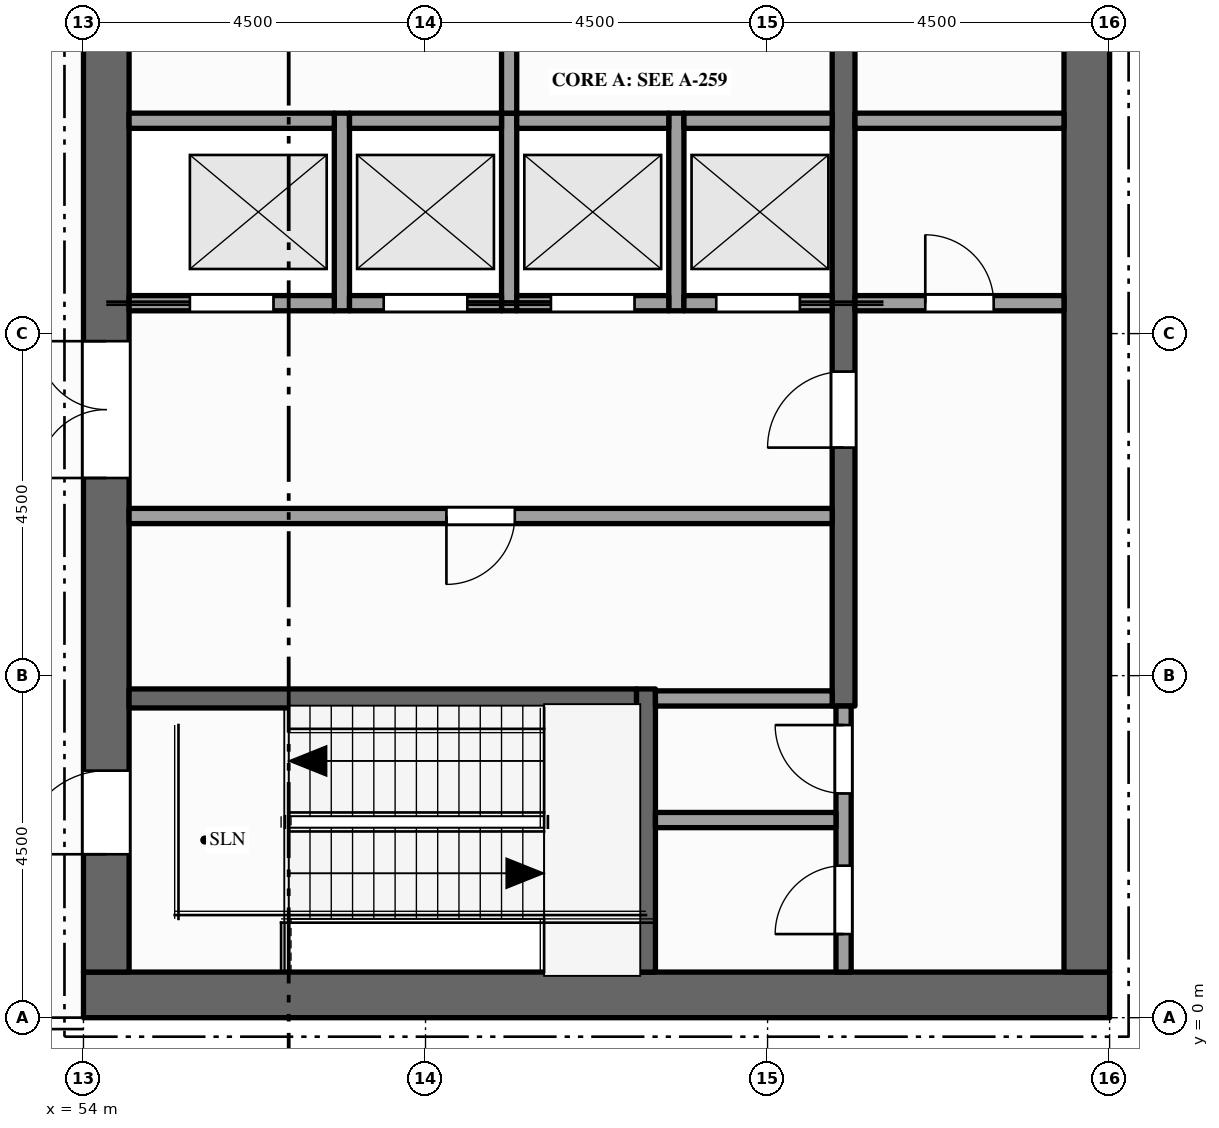
"""IFC4 building model, lengths in metres.
Left out: names, types, materials, properties, quantities, classifications, styles, units other than length and angle.
Written with IfcOpenShell. Run it as: python <this file> out.ifc"""

import sys

from ifc_helpers import new_model, si_unit, direction, frame, frame_2d, origin, place, context, subcontext, project, spatial, rectangle, extrude, element, fill, save


model = new_model("IFC4")
c1 = context("Model", 3, precision=1e-05, world=origin(), true_north=direction((0.0, 1.0)))
c2 = subcontext(c1, "Body", "Model", "MODEL_VIEW")
j1 = project(units=[si_unit("LENGTHUNIT", "METRE"), si_unit("PLANEANGLEUNIT", "RADIAN")], contexts=[c1])
p1 = place(None, origin())
s1 = spatial("IfcSite", under=j1, at=p1, CompositionType="ELEMENT")
p2 = place(p1, origin())
s2 = spatial("IfcBuilding", under=s1, at=p2, CompositionType="ELEMENT")
p3 = place(p2, frame((0.0, 0.0, 327.5)))
s3 = spatial("IfcBuildingStorey", under=s2, at=p3, CompositionType="ELEMENT", Elevation=327.5)
p4 = place(p3, frame((67.5, 0.3, -0.15), z_axis=(0.0, 0.0, 1.0), x_axis=(-1.0, 0.0, 0.0)))
e1 = element("IfcWall", 1, at=p4, inside=s3, PredefinedType="SHEAR", context=c2, shape_type="SweptSolid", body=[
    extrude(rectangle(XDim=13.5, YDim=0.6, at=frame_2d((6.75, 0.0))), origin(), (0.0, 0.0, 1.0), 4.5),
])
p5 = place(p3, frame((54.3, 0.6, -0.15), z_axis=(0.0, 0.0, 1.0), x_axis=(0.0, 1.0, 0.0)))
e2 = element("IfcWall", 2, at=p5, inside=s3, PredefinedType="SHEAR", context=c2, shape_type="SweptSolid", body=[
    extrude(rectangle(XDim=21.3, YDim=0.6, at=frame_2d((10.65, 0.0))), origin(), (0.0, 0.0, 1.0), 4.5),
])
p6 = place(p5, frame((6.5, 0.0, 0.15)))
e3 = element("IfcOpeningElement", 3, at=p6, cuts=e2, PredefinedType="OPENING", context=c2, shape_type="SweptSolid", body=[
    extrude(rectangle(XDim=1.8, YDim=2.1, at=frame_2d((0.9, 1.05))), frame((0.0, 0.31, 0.0), z_axis=(0.0, -1.0, 0.0), x_axis=(1.0, 0.0, 0.0)), (0.0, 0.0, 1.0), 0.62),
])
p7 = place(p5, frame((12.55, 0.0, 0.15)))
e4 = element("IfcOpeningElement", 4, at=p7, cuts=e2, PredefinedType="OPENING", context=c2, shape_type="SweptSolid", body=[
    extrude(rectangle(XDim=1.1, YDim=2.1, at=frame_2d((0.55, 1.05))), frame((0.0, 0.31, 0.0), z_axis=(0.0, -1.0, 0.0), x_axis=(1.0, 0.0, 0.0)), (0.0, 0.0, 1.0), 0.62),
])
p8 = place(p5, frame((1.55, 0.0, 0.15)))
e5 = element("IfcOpeningElement", 5, at=p8, cuts=e2, PredefinedType="OPENING", context=c2, shape_type="SweptSolid", body=[
    extrude(rectangle(XDim=1.1, YDim=2.1, at=frame_2d((0.55, 1.05))), frame((0.0, 0.31, 0.0), z_axis=(0.0, -1.0, 0.0), x_axis=(1.0, 0.0, 0.0)), (0.0, 0.0, 1.0), 0.62),
])
p9 = place(p5, frame((18.75, 0.0, 0.15)))
e6 = element("IfcOpeningElement", 6, at=p9, cuts=e2, PredefinedType="OPENING", context=c2, shape_type="SweptSolid", body=[
    extrude(rectangle(XDim=1.1, YDim=2.1, at=frame_2d((0.55, 1.05))), frame((0.0, 0.31, 0.0), z_axis=(0.0, -1.0, 0.0), x_axis=(1.0, 0.0, 0.0)), (0.0, 0.0, 1.0), 0.62),
])
p10 = place(p3, frame((67.2, 0.6, -0.15), z_axis=(0.0, 0.0, 1.0), x_axis=(0.0, 1.0, 0.0)))
e7 = element("IfcWall", 7, at=p10, inside=s3, PredefinedType="SHEAR", context=c2, shape_type="SweptSolid", body=[
    extrude(rectangle(XDim=21.3, YDim=0.6, at=frame_2d((10.65, 0.0))), origin(), (0.0, 0.0, 1.0), 4.5),
])
for number, where, z_axis, x_axis in (
    (8, (57.4, 9.3, 0.0), (0.0, 0.0, 1.0), (0.0, 1.0, 0.0)),
    (9, (59.6, 9.3, 0.0), (0.0, 0.0, 1.0), (0.0, 1.0, 0.0)),
):
    element("IfcWall", number, at=place(p3, frame(where, z_axis=z_axis, x_axis=x_axis)), inside=s3, PredefinedType="SOLIDWALL", context=c2, shape_type="SweptSolid", body=[
        extrude(rectangle(XDim=2.6, YDim=0.2, at=frame_2d((1.3, 0.0))), origin(), (0.0, 0.0, 1.0), 4.35),
    ])
p11 = place(p3, frame((59.6, 11.9, 0.0), z_axis=(0.0, 0.0, 1.0), x_axis=(0.0, 1.0, 0.0)))
e10 = element("IfcWall", 10, at=p11, inside=s3, PredefinedType="PARTITIONING", context=c2, shape_type="SweptSolid", body=[
    extrude(rectangle(XDim=3.6, YDim=0.2, at=frame_2d((1.8, 0.0))), origin(), (0.0, 0.0, 1.0), 4.35),
])
p12 = place(p11, frame((1.3, 0.0, 0.0)))
e11 = element("IfcOpeningElement", 11, at=p12, cuts=e10, PredefinedType="OPENING", context=c2, shape_type="SweptSolid", body=[
    extrude(rectangle(XDim=1.0, YDim=2.1, at=frame_2d((0.5, 1.05))), frame((0.0, 0.11, 0.0), z_axis=(0.0, -1.0, 0.0), x_axis=(1.0, 0.0, 0.0)), (0.0, 0.0, 1.0), 0.22),
])
p13 = place(p3, frame((61.4, 0.6, 0.0), z_axis=(0.0, 0.0, 1.0), x_axis=(0.0, 1.0, 0.0)))
e12 = element("IfcWall", 12, at=p13, inside=s3, PredefinedType="SHEAR", context=c2, shape_type="SweptSolid", body=[
    extrude(rectangle(XDim=3.725, YDim=0.25, at=frame_2d((1.862, 0.0))), origin(), (0.0, 0.0, 1.0), 4.35),
])
p14 = place(p3, frame((61.8, 9.3, 0.0), z_axis=(0.0, 0.0, 1.0), x_axis=(0.0, 1.0, 0.0)))
e13 = element("IfcWall", 13, at=p14, inside=s3, PredefinedType="SOLIDWALL", context=c2, shape_type="SweptSolid", body=[
    extrude(rectangle(XDim=2.6, YDim=0.2, at=frame_2d((1.3, 0.0))), origin(), (0.0, 0.0, 1.0), 4.35),
])
p15 = place(p3, frame((64.0, 0.6, 0.0), z_axis=(0.0, 0.0, 1.0), x_axis=(0.0, 1.0, 0.0)))
e14 = element("IfcWall", 14, at=p15, inside=s3, PredefinedType="PARTITIONING", context=c2, shape_type="SweptSolid", body=[
    extrude(rectangle(XDim=3.5, YDim=0.2, at=frame_2d((1.75, 0.0))), origin(), (0.0, 0.0, 1.0), 4.35),
])
p16 = place(p15, frame((0.5, 0.0, 0.0)))
e15 = element("IfcOpeningElement", 15, at=p16, cuts=e14, PredefinedType="OPENING", context=c2, shape_type="SweptSolid", body=[
    extrude(rectangle(XDim=0.9, YDim=2.1, at=frame_2d((0.45, 1.05))), frame((0.0, 0.11, 0.0), z_axis=(0.0, -1.0, 0.0), x_axis=(1.0, 0.0, 0.0)), (0.0, 0.0, 1.0), 0.22),
])
p17 = place(p15, frame((2.35, 0.0, 0.0)))
e16 = element("IfcOpeningElement", 16, at=p17, cuts=e14, PredefinedType="OPENING", context=c2, shape_type="SweptSolid", body=[
    extrude(rectangle(XDim=0.9, YDim=2.1, at=frame_2d((0.45, 1.05))), frame((0.0, 0.11, 0.0), z_axis=(0.0, -1.0, 0.0), x_axis=(1.0, 0.0, 0.0)), (0.0, 0.0, 1.0), 0.22),
])
p18 = place(p3, frame((64.0, 4.1, 0.0), z_axis=(0.0, 0.0, 1.0), x_axis=(0.0, 1.0, 0.0)))
e17 = element("IfcWall", 17, at=p18, inside=s3, PredefinedType="SHEAR", context=c2, shape_type="SweptSolid", body=[
    extrude(rectangle(XDim=14.5, YDim=0.3, at=frame_2d((7.25, 0.0))), origin(), (0.0, 0.0, 1.0), 4.35),
])
p19 = place(p18, frame((3.4, 0.0, 0.0)))
e18 = element("IfcOpeningElement", 18, at=p19, cuts=e17, PredefinedType="OPENING", context=c2, shape_type="SweptSolid", body=[
    extrude(rectangle(XDim=1.0, YDim=2.1, at=frame_2d((0.5, 1.05))), frame((0.0, 0.16, 0.0), z_axis=(0.0, -1.0, 0.0), x_axis=(1.0, 0.0, 0.0)), (0.0, 0.0, 1.0), 0.32),
])
p20 = place(p18, frame((9.1, 0.0, 0.0)))
e19 = element("IfcOpeningElement", 19, at=p20, cuts=e17, PredefinedType="OPENING", context=c2, shape_type="SweptSolid", body=[
    extrude(rectangle(XDim=1.0, YDim=2.1, at=frame_2d((0.5, 1.05))), frame((0.0, 0.16, 0.0), z_axis=(0.0, -1.0, 0.0), x_axis=(1.0, 0.0, 0.0)), (0.0, 0.0, 1.0), 0.32),
])
p21 = place(p3, frame((61.525, 2.6, 0.0), z_axis=(0.0, 0.0, 1.0), x_axis=(1.0, 0.0, 0.0)))
e20 = element("IfcWall", 20, at=p21, inside=s3, PredefinedType="PARTITIONING", context=c2, shape_type="SweptSolid", body=[
    extrude(rectangle(XDim=2.375, YDim=0.2, at=frame_2d((1.188, 0.0))), origin(), (0.0, 0.0, 1.0), 4.35),
])
p22 = place(p3, frame((54.6, 4.2, 0.0), z_axis=(0.0, 0.0, 1.0), x_axis=(1.0, 0.0, 0.0)))
e21 = element("IfcWall", 21, at=p22, inside=s3, PredefinedType="SHEAR", context=c2, shape_type="SweptSolid", body=[
    extrude(rectangle(XDim=6.675, YDim=0.25, at=frame_2d((3.337, 0.0))), origin(), (0.0, 0.0, 1.0), 4.35),
])
p23 = place(p3, frame((61.525, 4.2, 0.0), z_axis=(0.0, 0.0, 1.0), x_axis=(1.0, 0.0, 0.0)))
e22 = element("IfcWall", 22, at=p23, inside=s3, PredefinedType="PARTITIONING", context=c2, shape_type="SweptSolid", body=[
    extrude(rectangle(XDim=2.325, YDim=0.2, at=frame_2d((1.163, 0.0))), origin(), (0.0, 0.0, 1.0), 4.35),
])
p24 = place(p3, frame((54.6, 6.6, 0.0), z_axis=(0.0, 0.0, 1.0), x_axis=(1.0, 0.0, 0.0)))
e23 = element("IfcWall", 23, at=p24, inside=s3, PredefinedType="PARTITIONING", context=c2, shape_type="SweptSolid", body=[
    extrude(rectangle(XDim=9.25, YDim=0.2, at=frame_2d((4.625, 0.0))), origin(), (0.0, 0.0, 1.0), 4.35),
])
p25 = place(p24, frame((4.175, 0.0, 0.0)))
e24 = element("IfcOpeningElement", 24, at=p25, cuts=e23, PredefinedType="OPENING", context=c2, shape_type="SweptSolid", body=[
    extrude(rectangle(XDim=0.9, YDim=2.1, at=frame_2d((0.45, 1.05))), frame((0.0, 0.11, 0.0), z_axis=(0.0, -1.0, 0.0), x_axis=(1.0, 0.0, 0.0)), (0.0, 0.0, 1.0), 0.22),
])
p26 = place(p3, frame((54.6, 9.4, 0.0), z_axis=(0.0, 0.0, 1.0), x_axis=(1.0, 0.0, 0.0)))
e25 = element("IfcWall", 25, at=p26, inside=s3, PredefinedType="SOLIDWALL", context=c2, shape_type="SweptSolid", body=[
    extrude(rectangle(XDim=2.7, YDim=0.2, at=frame_2d((1.35, 0.0))), origin(), (0.0, 0.0, 1.0), 4.35),
])
p27 = place(p26, frame((0.8, 0.0, 0.012)))
e26 = element("IfcOpeningElement", 26, at=p27, cuts=e25, PredefinedType="OPENING", context=c2, shape_type="SweptSolid", body=[
    extrude(rectangle(XDim=1.1, YDim=2.1, at=frame_2d((0.55, 1.05))), frame((0.0, 0.11, 0.0), z_axis=(0.0, -1.0, 0.0), x_axis=(1.0, 0.0, 0.0)), (0.0, 0.0, 1.0), 0.22),
])
p28 = place(p3, frame((57.5, 9.4, 0.0), z_axis=(0.0, 0.0, 1.0), x_axis=(1.0, 0.0, 0.0)))
e27 = element("IfcWall", 27, at=p28, inside=s3, PredefinedType="SOLIDWALL", context=c2, shape_type="SweptSolid", body=[
    extrude(rectangle(XDim=2.0, YDim=0.2, at=frame_2d((1.0, 0.0))), origin(), (0.0, 0.0, 1.0), 4.35),
])
p29 = place(p28, frame((0.45, 0.0, 0.012)))
e28 = element("IfcOpeningElement", 28, at=p29, cuts=e27, PredefinedType="OPENING", context=c2, shape_type="SweptSolid", body=[
    extrude(rectangle(XDim=1.1, YDim=2.1, at=frame_2d((0.55, 1.05))), frame((0.0, 0.11, 0.0), z_axis=(0.0, -1.0, 0.0), x_axis=(1.0, 0.0, 0.0)), (0.0, 0.0, 1.0), 0.22),
])
p30 = place(p3, frame((59.7, 9.4, 0.0), z_axis=(0.0, 0.0, 1.0), x_axis=(1.0, 0.0, 0.0)))
e29 = element("IfcWall", 29, at=p30, inside=s3, PredefinedType="SOLIDWALL", context=c2, shape_type="SweptSolid", body=[
    extrude(rectangle(XDim=2.0, YDim=0.2, at=frame_2d((1.0, 0.0))), origin(), (0.0, 0.0, 1.0), 4.35),
])
p31 = place(p30, frame((0.45, 0.0, 0.012)))
e30 = element("IfcOpeningElement", 30, at=p31, cuts=e29, PredefinedType="OPENING", context=c2, shape_type="SweptSolid", body=[
    extrude(rectangle(XDim=1.1, YDim=2.1, at=frame_2d((0.55, 1.05))), frame((0.0, 0.11, 0.0), z_axis=(0.0, -1.0, 0.0), x_axis=(1.0, 0.0, 0.0)), (0.0, 0.0, 1.0), 0.22),
])
p32 = place(p3, frame((61.9, 9.4, 0.0), z_axis=(0.0, 0.0, 1.0), x_axis=(1.0, 0.0, 0.0)))
e31 = element("IfcWall", 31, at=p32, inside=s3, PredefinedType="SOLIDWALL", context=c2, shape_type="SweptSolid", body=[
    extrude(rectangle(XDim=1.95, YDim=0.2, at=frame_2d((0.975, 0.0))), origin(), (0.0, 0.0, 1.0), 4.35),
])
p33 = place(p32, frame((0.425, 0.0, 0.012)))
e32 = element("IfcOpeningElement", 32, at=p33, cuts=e31, PredefinedType="OPENING", context=c2, shape_type="SweptSolid", body=[
    extrude(rectangle(XDim=1.1, YDim=2.1, at=frame_2d((0.55, 1.05))), frame((0.0, 0.11, 0.0), z_axis=(0.0, -1.0, 0.0), x_axis=(1.0, 0.0, 0.0)), (0.0, 0.0, 1.0), 0.22),
])
p34 = place(p3, frame((64.15, 9.4, 0.0), z_axis=(0.0, 0.0, 1.0), x_axis=(1.0, 0.0, 0.0)))
e33 = element("IfcWall", 33, at=p34, inside=s3, PredefinedType="PARTITIONING", context=c2, shape_type="SweptSolid", body=[
    extrude(rectangle(XDim=2.75, YDim=0.2, at=frame_2d((1.375, 0.0))), origin(), (0.0, 0.0, 1.0), 4.35),
])
p35 = place(p34, frame((0.925, 0.0, 0.0)))
e34 = element("IfcOpeningElement", 34, at=p35, cuts=e33, PredefinedType="OPENING", context=c2, shape_type="SweptSolid", body=[
    extrude(rectangle(XDim=0.9, YDim=2.1, at=frame_2d((0.45, 1.05))), frame((0.0, 0.11, 0.0), z_axis=(0.0, -1.0, 0.0), x_axis=(1.0, 0.0, 0.0)), (0.0, 0.0, 1.0), 0.22),
])
p36 = place(p3, frame((54.6, 11.8, 0.0), z_axis=(0.0, 0.0, 1.0), x_axis=(1.0, 0.0, 0.0)))
e35 = element("IfcWall", 35, at=p36, inside=s3, PredefinedType="SOLIDWALL", context=c2, shape_type="SweptSolid", body=[
    extrude(rectangle(XDim=2.7, YDim=0.2, at=frame_2d((1.35, 0.0))), origin(), (0.0, 0.0, 1.0), 4.35),
])
for number, where, z_axis, x_axis in (
    (36, (57.5, 11.8, 0.0), (0.0, 0.0, 1.0), (1.0, 0.0, 0.0)),
    (37, (59.7, 11.8, 0.0), (0.0, 0.0, 1.0), (1.0, 0.0, 0.0)),
):
    element("IfcWall", number, at=place(p3, frame(where, z_axis=z_axis, x_axis=x_axis)), inside=s3, PredefinedType="SOLIDWALL", context=c2, shape_type="SweptSolid", body=[
        extrude(rectangle(XDim=2.0, YDim=0.2, at=frame_2d((1.0, 0.0))), origin(), (0.0, 0.0, 1.0), 4.35),
    ])
p37 = place(p3, frame((61.9, 11.8, 0.0), z_axis=(0.0, 0.0, 1.0), x_axis=(1.0, 0.0, 0.0)))
e38 = element("IfcWall", 38, at=p37, inside=s3, PredefinedType="SOLIDWALL", context=c2, shape_type="SweptSolid", body=[
    extrude(rectangle(XDim=1.95, YDim=0.2, at=frame_2d((0.975, 0.0))), origin(), (0.0, 0.0, 1.0), 4.35),
])
p38 = place(p3, frame((64.15, 11.8, 0.0), z_axis=(0.0, 0.0, 1.0), x_axis=(1.0, 0.0, 0.0)))
e39 = element("IfcWall", 39, at=p38, inside=s3, PredefinedType="PARTITIONING", context=c2, shape_type="SweptSolid", body=[
    extrude(rectangle(XDim=2.75, YDim=0.2, at=frame_2d((1.375, 0.0))), origin(), (0.0, 0.0, 1.0), 4.35),
])
p39 = place(p27, origin())
e40 = element("IfcDoor", 40, at=p39, inside=s3, OperationType="SLIDING_TO_LEFT", PredefinedType="DOOR", context=c2, shape_type="SweptSolid", body=[
    extrude(rectangle(XDim=1.1, YDim=2.1, at=frame_2d((0.55, 1.05))), frame((0.0, 0.025, 0.0), z_axis=(0.0, -1.0, 0.0), x_axis=(1.0, 0.0, 0.0)), (0.0, 0.0, 1.0), 0.05),
])
fill(e26, e40)
p40 = place(p29, origin())
e41 = element("IfcDoor", 41, at=p40, inside=s3, OperationType="SLIDING_TO_RIGHT", PredefinedType="DOOR", context=c2, shape_type="SweptSolid", body=[
    extrude(rectangle(XDim=1.1, YDim=2.1, at=frame_2d((0.55, 1.05))), frame((0.0, 0.025, 0.0), z_axis=(0.0, -1.0, 0.0), x_axis=(1.0, 0.0, 0.0)), (0.0, 0.0, 1.0), 0.05),
])
fill(e28, e41)
p41 = place(p31, origin())
e42 = element("IfcDoor", 42, at=p41, inside=s3, OperationType="SLIDING_TO_LEFT", PredefinedType="DOOR", context=c2, shape_type="SweptSolid", body=[
    extrude(rectangle(XDim=1.1, YDim=2.1, at=frame_2d((0.55, 1.05))), frame((0.0, 0.025, 0.0), z_axis=(0.0, -1.0, 0.0), x_axis=(1.0, 0.0, 0.0)), (0.0, 0.0, 1.0), 0.05),
])
fill(e30, e42)
p42 = place(p33, origin())
e43 = element("IfcDoor", 43, at=p42, inside=s3, OperationType="SLIDING_TO_RIGHT", PredefinedType="DOOR", context=c2, shape_type="SweptSolid", body=[
    extrude(rectangle(XDim=1.1, YDim=2.1, at=frame_2d((0.55, 1.05))), frame((0.0, 0.025, 0.0), z_axis=(0.0, -1.0, 0.0), x_axis=(1.0, 0.0, 0.0)), (0.0, 0.0, 1.0), 0.05),
])
fill(e32, e43)
p43 = place(p6, origin())
e44 = element("IfcDoor", 44, at=p43, inside=s3, OperationType="DOUBLE_DOOR_SINGLE_SWING", PredefinedType="DOOR", context=c2, shape_type="SweptSolid", body=[
    extrude(rectangle(XDim=1.8, YDim=2.1, at=frame_2d((0.9, 1.05))), frame((0.0, 0.025, 0.0), z_axis=(0.0, -1.0, 0.0), x_axis=(1.0, 0.0, 0.0)), (0.0, 0.0, 1.0), 0.05),
])
fill(e3, e44)
p44 = place(p19, origin())
e45 = element("IfcDoor", 45, at=p44, inside=s3, OperationType="SINGLE_SWING_LEFT", PredefinedType="DOOR", context=c2, shape_type="SweptSolid", body=[
    extrude(rectangle(XDim=1.0, YDim=2.1, at=frame_2d((0.5, 1.05))), frame((0.0, 0.025, 0.0), z_axis=(0.0, -1.0, 0.0), x_axis=(1.0, 0.0, 0.0)), (0.0, 0.0, 1.0), 0.05),
])
fill(e18, e45)
p45 = place(p35, origin())
e46 = element("IfcDoor", 46, at=p45, inside=s3, OperationType="SINGLE_SWING_LEFT", PredefinedType="DOOR", context=c2, shape_type="SweptSolid", body=[
    extrude(rectangle(XDim=0.9, YDim=2.1, at=frame_2d((0.45, 1.05))), frame((0.0, 0.025, 0.0), z_axis=(0.0, -1.0, 0.0), x_axis=(1.0, 0.0, 0.0)), (0.0, 0.0, 1.0), 0.05),
])
fill(e34, e46)
p46 = place(p8, origin())
e47 = element("IfcDoor", 47, at=p46, inside=s3, OperationType="SINGLE_SWING_LEFT", PredefinedType="DOOR", context=c2, shape_type="SweptSolid", body=[
    extrude(rectangle(XDim=1.1, YDim=2.1, at=frame_2d((0.55, 1.05))), frame((0.0, 0.025, 0.0), z_axis=(0.0, -1.0, 0.0), x_axis=(1.0, 0.0, 0.0)), (0.0, 0.0, 1.0), 0.05),
])
fill(e5, e47)
p47 = place(p16, origin())
e48 = element("IfcDoor", 48, at=p47, inside=s3, OperationType="SINGLE_SWING_LEFT", PredefinedType="DOOR", context=c2, shape_type="SweptSolid", body=[
    extrude(rectangle(XDim=0.9, YDim=2.1, at=frame_2d((0.45, 1.05))), frame((0.0, 0.025, 0.0), z_axis=(0.0, -1.0, 0.0), x_axis=(1.0, 0.0, 0.0)), (0.0, 0.0, 1.0), 0.05),
])
fill(e15, e48)
p48 = place(p17, origin())
e49 = element("IfcDoor", 49, at=p48, inside=s3, OperationType="SINGLE_SWING_RIGHT", PredefinedType="DOOR", context=c2, shape_type="SweptSolid", body=[
    extrude(rectangle(XDim=0.9, YDim=2.1, at=frame_2d((0.45, 1.05))), frame((0.0, 0.025, 0.0), z_axis=(0.0, -1.0, 0.0), x_axis=(1.0, 0.0, 0.0)), (0.0, 0.0, 1.0), 0.05),
])
fill(e16, e49)
p49 = place(p25, origin())
e50 = element("IfcDoor", 50, at=p49, inside=s3, OperationType="SINGLE_SWING_LEFT", PredefinedType="DOOR", context=c2, shape_type="SweptSolid", body=[
    extrude(rectangle(XDim=0.9, YDim=2.1, at=frame_2d((0.45, 1.05))), frame((0.0, 0.025, 0.0), z_axis=(0.0, -1.0, 0.0), x_axis=(1.0, 0.0, 0.0)), (0.0, 0.0, 1.0), 0.05),
])
fill(e24, e50)
save(model, sys.argv[1])
